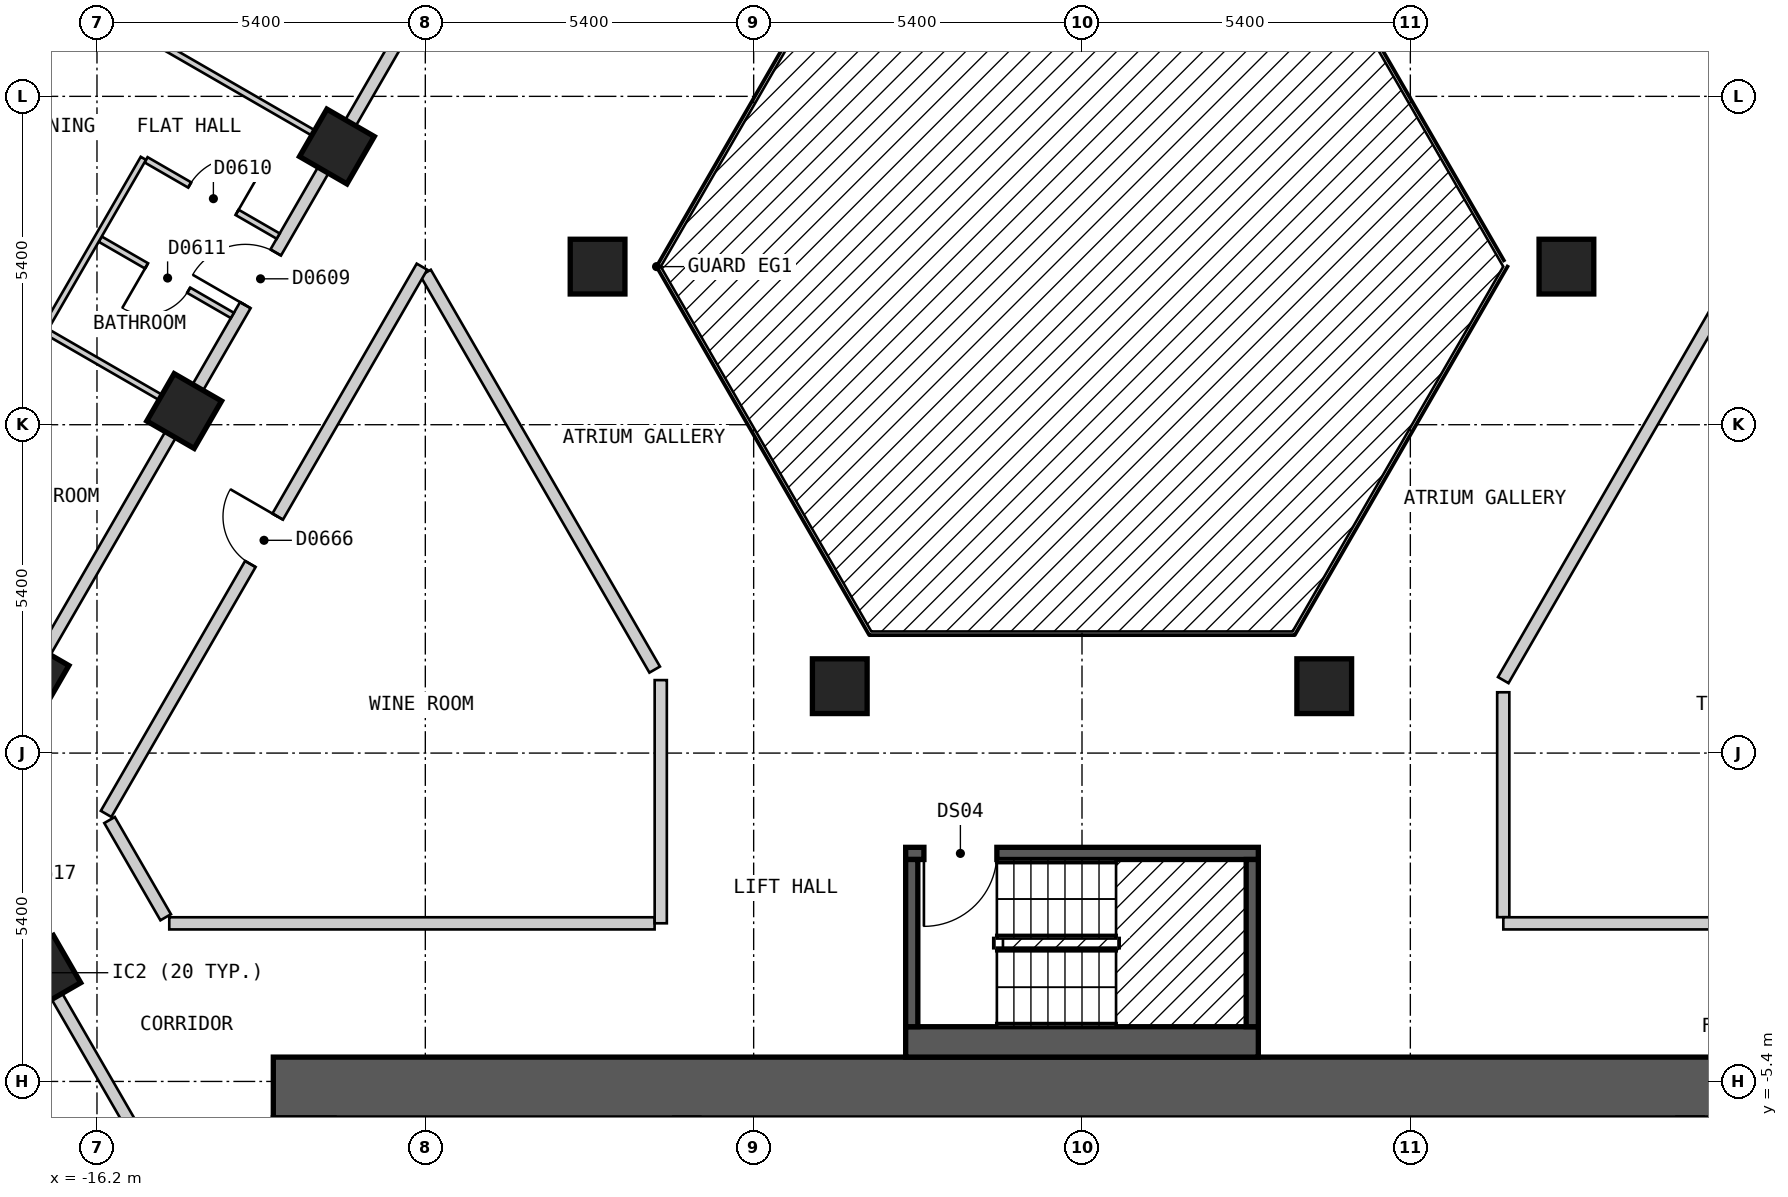
"""IFC4 building model, lengths in metres.
Left out: names, types, materials, properties, quantities, classifications, styles, units other than length and angle.
Written with IfcOpenShell. Run it as: python <this file> out.ifc"""

import sys

from ifc_helpers import new_model, si_unit, direction, frame, frame_2d, origin, origin_2d, place, context, subcontext, project, spatial, polyline, rectangle, outline, extrude, element, fill, save


model = new_model("IFC4")
c1 = context("Model", 3, precision=1e-05, world=origin(), true_north=direction((0.0, 1.0)))
c2 = subcontext(c1, "Body", "Model", "MODEL_VIEW")
j1 = project(units=[si_unit("LENGTHUNIT", "METRE"), si_unit("PLANEANGLEUNIT", "RADIAN")], contexts=[c1])
p1 = place(None, origin())
s1 = spatial("IfcSite", under=j1, at=p1, CompositionType="ELEMENT")
p2 = place(p1, origin())
s2 = spatial("IfcBuilding", under=s1, at=p2, CompositionType="ELEMENT")
p3 = place(p2, frame((0.0, 0.0, 75.0)))
s3 = spatial("IfcBuildingStorey", under=s2, at=p3, CompositionType="ELEMENT", Elevation=75.0)
for number, where, z_axis, x_axis in (
    (1, (-17.083, -3.612, 0.0), (0.0, 0.0, 1.0), (0.5, -0.866, 0.0)),
    (2, (3.984, 1.1, 0.0), (0.0, 0.0, 1.0), (1.0, 0.0, 0.0)),
    (3, (7.967, 8.0, 0.0), (0.0, 0.0, 1.0), (1.0, 0.0, 0.0)),
    (4, (-7.967, 8.0, 0.0), (0.0, 0.0, 1.0), (1.0, 0.0, 0.0)),
    (5, (-12.254, 9.975, 0.0), (0.0, 0.0, 1.0), (-0.5, -0.866, 0.0)),
    (6, (-14.766, 5.625, 0.0), (0.0, 0.0, 1.0), (-0.5, -0.866, 0.0)),
    (7, (-3.984, 1.1, 0.0), (0.0, 0.0, 1.0), (1.0, 0.0, 0.0)),
    (8, (-17.277, 1.275, 0.0), (0.0, 0.0, 1.0), (-0.5, -0.866, 0.0)),
):
    element("IfcColumn", number, at=place(p3, frame(where, z_axis=z_axis, x_axis=x_axis)), inside=s3, PredefinedType="COLUMN", context=c2, shape_type="SweptSolid", body=[
        extrude(rectangle(XDim=0.9, YDim=0.9, at=origin_2d()), origin(), (0.0, 0.0, 1.0), 3.0),
    ])
p4 = place(p3, frame((-13.3, -5.5, 0.0), z_axis=(0.0, 0.0, 1.0), x_axis=(1.0, 0.0, 0.0)))
e9 = element("IfcWall", 9, at=p4, inside=s3, PredefinedType="SHEAR", context=c2, shape_type="SweptSolid", body=[
    extrude(rectangle(XDim=26.6, YDim=1.0, at=frame_2d((13.3, 0.0))), origin(), (0.0, 0.0, 1.0), 2.7),
])
p5 = place(p4, frame((23.65, 0.0, 0.0)))
e10 = element("IfcOpeningElement", 10, at=p5, cuts=e9, PredefinedType="OPENING", context=c2, shape_type="SweptSolid", body=[
    extrude(rectangle(XDim=1.2, YDim=2.1, at=frame_2d((0.6, 1.05))), frame((0.0, 0.51, 0.0), z_axis=(0.0, -1.0, 0.0), x_axis=(1.0, 0.0, 0.0)), (0.0, 0.0, 1.0), 1.02),
])
p6 = place(p3, frame((-15.747, 24.425, 0.0), z_axis=(0.0, 0.0, 1.0), x_axis=(-0.500027479704, -0.866009537788, 0.0)))
e11 = element("IfcWall", 11, at=p6, inside=s3, PredefinedType="SOLIDWALL", context=c2, shape_type="SweptSolid", body=[
    extrude(outline(polyline([(0.0, -0.15), (26.559, -0.15), (26.478, 0.15), (0.08, 0.15), (0.0, -0.15)])), origin(), (0.0, 0.0, 1.0), 2.7),
])
p7 = place(p6, frame((1.227, 0.0, 0.15)))
e12 = element("IfcOpeningElement", 12, at=p7, cuts=e11, PredefinedType="OPENING", context=c2, shape_type="SweptSolid", body=[
    extrude(rectangle(XDim=1.5, YDim=2.1, at=frame_2d((0.75, 1.05))), frame((0.0, 0.16, 0.0), z_axis=(0.0, -1.0, 0.0), x_axis=(1.0, 0.0, 0.0)), (0.0, 0.0, 1.0), 0.32),
])
p8 = place(p6, frame((3.739, 0.0, 0.15)))
e13 = element("IfcOpeningElement", 13, at=p8, cuts=e11, PredefinedType="OPENING", context=c2, shape_type="SweptSolid", body=[
    extrude(rectangle(XDim=1.5, YDim=2.1, at=frame_2d((0.75, 1.05))), frame((0.0, 0.16, 0.0), z_axis=(0.0, -1.0, 0.0), x_axis=(1.0, 0.0, 0.0)), (0.0, 0.0, 1.0), 0.32),
])
p9 = place(p6, frame((6.25, 0.0, 0.15)))
e14 = element("IfcOpeningElement", 14, at=p9, cuts=e11, PredefinedType="OPENING", context=c2, shape_type="SweptSolid", body=[
    extrude(rectangle(XDim=1.5, YDim=2.1, at=frame_2d((0.75, 1.05))), frame((0.0, 0.16, 0.0), z_axis=(0.0, -1.0, 0.0), x_axis=(1.0, 0.0, 0.0)), (0.0, 0.0, 1.0), 0.32),
])
p10 = place(p6, frame((8.761, 0.0, 0.15)))
e15 = element("IfcOpeningElement", 15, at=p10, cuts=e11, PredefinedType="OPENING", context=c2, shape_type="SweptSolid", body=[
    extrude(rectangle(XDim=1.5, YDim=2.1, at=frame_2d((0.75, 1.05))), frame((0.0, 0.16, 0.0), z_axis=(0.0, -1.0, 0.0), x_axis=(1.0, 0.0, 0.0)), (0.0, 0.0, 1.0), 0.32),
])
p11 = place(p6, frame((11.273, 0.0, 0.15)))
e16 = element("IfcOpeningElement", 16, at=p11, cuts=e11, PredefinedType="OPENING", context=c2, shape_type="SweptSolid", body=[
    extrude(rectangle(XDim=1.5, YDim=2.1, at=frame_2d((0.75, 1.05))), frame((0.0, 0.16, 0.0), z_axis=(0.0, -1.0, 0.0), x_axis=(1.0, 0.0, 0.0)), (0.0, 0.0, 1.0), 0.32),
])
p12 = place(p6, frame((13.785, 0.0, 0.15)))
e17 = element("IfcOpeningElement", 17, at=p12, cuts=e11, PredefinedType="OPENING", context=c2, shape_type="SweptSolid", body=[
    extrude(rectangle(XDim=1.5, YDim=2.1, at=frame_2d((0.75, 1.05))), frame((0.0, 0.16, 0.0), z_axis=(0.0, -1.0, 0.0), x_axis=(1.0, 0.0, 0.0)), (0.0, 0.0, 1.0), 0.32),
])
p13 = place(p6, frame((16.296, 0.0, 0.15)))
e18 = element("IfcOpeningElement", 18, at=p13, cuts=e11, PredefinedType="OPENING", context=c2, shape_type="SweptSolid", body=[
    extrude(rectangle(XDim=1.5, YDim=2.1, at=frame_2d((0.75, 1.05))), frame((0.0, 0.16, 0.0), z_axis=(0.0, -1.0, 0.0), x_axis=(1.0, 0.0, 0.0)), (0.0, 0.0, 1.0), 0.32),
])
p14 = place(p6, frame((18.807, 0.0, 0.15)))
e19 = element("IfcOpeningElement", 19, at=p14, cuts=e11, PredefinedType="OPENING", context=c2, shape_type="SweptSolid", body=[
    extrude(rectangle(XDim=1.5, YDim=2.1, at=frame_2d((0.75, 1.05))), frame((0.0, 0.16, 0.0), z_axis=(0.0, -1.0, 0.0), x_axis=(1.0, 0.0, 0.0)), (0.0, 0.0, 1.0), 0.32),
])
p15 = place(p6, frame((21.319, 0.0, 0.15)))
e20 = element("IfcOpeningElement", 20, at=p15, cuts=e11, PredefinedType="OPENING", context=c2, shape_type="SweptSolid", body=[
    extrude(rectangle(XDim=1.5, YDim=2.1, at=frame_2d((0.75, 1.05))), frame((0.0, 0.16, 0.0), z_axis=(0.0, -1.0, 0.0), x_axis=(1.0, 0.0, 0.0)), (0.0, 0.0, 1.0), 0.32),
])
p16 = place(p6, frame((23.831, 0.0, 0.15)))
e21 = element("IfcOpeningElement", 21, at=p16, cuts=e11, PredefinedType="OPENING", context=c2, shape_type="SweptSolid", body=[
    extrude(rectangle(XDim=1.5, YDim=2.1, at=frame_2d((0.75, 1.05))), frame((0.0, 0.16, 0.0), z_axis=(0.0, -1.0, 0.0), x_axis=(1.0, 0.0, 0.0)), (0.0, 0.0, 1.0), 0.32),
])
p17 = place(p3, frame((-2.9, -4.75, 0.0), z_axis=(0.0, 0.0, 1.0), x_axis=(1.0, 0.0, 0.0)))
e22 = element("IfcWall", 22, at=p17, inside=s3, PredefinedType="SOLIDWALL", context=c2, shape_type="SweptSolid", body=[
    extrude(rectangle(XDim=5.8, YDim=0.5, at=frame_2d((2.9, 0.0))), origin(), (0.0, 0.0, 1.0), 2.7),
])
p18 = place(p3, frame((-2.9, -1.65, 0.0), z_axis=(0.0, 0.0, 1.0), x_axis=(1.0, 0.0, 0.0)))
e23 = element("IfcWall", 23, at=p18, inside=s3, PredefinedType="SOLIDWALL", context=c2, shape_type="SweptSolid", body=[
    extrude(rectangle(XDim=5.8, YDim=0.2, at=frame_2d((2.9, 0.0))), origin(), (0.0, 0.0, 1.0), 2.7),
])
p19 = place(p18, frame((0.3, 0.0, 0.0)))
e24 = element("IfcOpeningElement", 24, at=p19, cuts=e23, PredefinedType="OPENING", context=c2, shape_type="SweptSolid", body=[
    extrude(rectangle(XDim=1.2, YDim=2.1, at=frame_2d((0.6, 1.05))), frame((0.0, 0.11, 0.0), z_axis=(0.0, -1.0, 0.0), x_axis=(1.0, 0.0, 0.0)), (0.0, 0.0, 1.0), 0.22),
])
for number, where, z_axis, x_axis in (
    (25, (-2.8, -4.5, 0.0), (0.0, 0.0, 1.0), (0.0, 1.0, 0.0)),
    (26, (2.8, -4.5, 0.0), (0.0, 0.0, 1.0), (0.0, 1.0, 0.0)),
):
    element("IfcWall", number, at=place(p3, frame(where, z_axis=z_axis, x_axis=x_axis)), inside=s3, PredefinedType="SOLIDWALL", context=c2, shape_type="SweptSolid", body=[
        extrude(rectangle(XDim=2.75, YDim=0.2, at=frame_2d((1.375, 0.0))), origin(), (0.0, 0.0, 1.0), 2.7),
    ])
p20 = place(p3, frame((-10.796, 7.899, 0.0), z_axis=(0.0, 0.0, 1.0), x_axis=(0.500010383074, -0.866019409031, 0.0)))
e27 = element("IfcWall", 27, at=p20, inside=s3, PredefinedType="PARTITIONING", context=c2, shape_type="SweptSolid", body=[
    extrude(rectangle(XDim=7.535, YDim=0.2, at=frame_2d((3.768, 0.0))), origin(), (0.0, 0.0, 1.0), 2.7),
])
p21 = place(p3, frame((-15.993, -1.101, 0.0), z_axis=(0.0, 0.0, 1.0), x_axis=(0.499894174133, -0.866086493757, 0.0)))
e28 = element("IfcWall", 28, at=p21, inside=s3, PredefinedType="PARTITIONING", context=c2, shape_type="SweptSolid", body=[
    extrude(rectangle(XDim=1.846, YDim=0.2, at=frame_2d((0.923, 0.0))), origin(), (0.0, 0.0, 1.0), 2.7),
])
p22 = place(p3, frame((-18.533, -1.101, 0.0), z_axis=(0.0, 0.0, 1.0), x_axis=(0.500022085096, -0.866012652573, 0.0)))
e29 = element("IfcWall", 29, at=p22, inside=s3, PredefinedType="PARTITIONING", context=c2, shape_type="SweptSolid", body=[
    extrude(rectangle(XDim=6.066, YDim=0.2, at=frame_2d((3.033, 0.0))), origin(), (0.0, 0.0, 1.0), 2.7),
])
p23 = place(p22, frame((0.532, 0.0, 0.0)))
e30 = element("IfcOpeningElement", 30, at=p23, cuts=e29, PredefinedType="OPENING", context=c2, shape_type="SweptSolid", body=[
    extrude(rectangle(XDim=1.0, YDim=2.1, at=frame_2d((0.5, 1.05))), frame((0.0, 0.11, 0.0), z_axis=(0.0, -1.0, 0.0), x_axis=(1.0, 0.0, 0.0)), (0.0, 0.0, 1.0), 0.22),
])
p24 = place(p3, frame((8.488, 16.5, 0.0), z_axis=(0.0, 0.0, 1.0), x_axis=(0.499986836607, -0.86603300354, 0.0)))
e31 = element("IfcWall", 31, at=p24, inside=s3, PredefinedType="PARTITIONING", context=c2, shape_type="SweptSolid", body=[
    extrude(rectangle(XDim=20.09, YDim=0.2, at=frame_2d((10.045, 0.0))), origin(), (0.0, 0.0, 1.0), 2.7),
])
p25 = place(p24, frame((14.569, 0.0, 0.0)))
e32 = element("IfcOpeningElement", 32, at=p25, cuts=e31, PredefinedType="OPENING", context=c2, shape_type="SweptSolid", body=[
    extrude(rectangle(XDim=1.0, YDim=2.1, at=frame_2d((0.5, 1.05))), frame((0.0, 0.11, 0.0), z_axis=(0.0, -1.0, 0.0), x_axis=(1.0, 0.0, 0.0)), (0.0, 0.0, 1.0), 0.22),
])
p26 = place(p3, frame((6.928, 1.0, 0.0), z_axis=(0.0, 0.0, 1.0), x_axis=(0.0, -1.0, 0.0)))
e33 = element("IfcWall", 33, at=p26, inside=s3, PredefinedType="PARTITIONING", context=c2, shape_type="SweptSolid", body=[
    extrude(rectangle(XDim=3.699, YDim=0.2, at=frame_2d((1.85, 0.0))), origin(), (0.0, 0.0, 1.0), 2.7),
])
p27 = place(p3, frame((-15.011, -2.8, 0.0), z_axis=(0.0, 0.0, 1.0), x_axis=(1.0, 0.0, 0.0)))
e34 = element("IfcWall", 34, at=p27, inside=s3, PredefinedType="PARTITIONING", context=c2, shape_type="SweptSolid", body=[
    extrude(rectangle(XDim=7.982, YDim=0.2, at=frame_2d((3.991, 0.0))), origin(), (0.0, 0.0, 1.0), 2.7),
])
p28 = place(p3, frame((6.929, -2.8, 0.0), z_axis=(0.0, 0.0, 1.0), x_axis=(1.0, 0.0, 0.0)))
e35 = element("IfcWall", 35, at=p28, inside=s3, PredefinedType="PARTITIONING", context=c2, shape_type="SweptSolid", body=[
    extrude(rectangle(XDim=7.966, YDim=0.2, at=frame_2d((3.983, 0.0))), origin(), (0.0, 0.0, 1.0), 2.7),
])
p29 = place(p3, frame((6.928, 1.2, 0.0), z_axis=(0.0, 0.0, 1.0), x_axis=(0.500055327065, 0.865993458332, 0.0)))
e36 = element("IfcWall", 36, at=p29, inside=s3, PredefinedType="PARTITIONING", context=c2, shape_type="SweptSolid", body=[
    extrude(rectangle(XDim=7.851, YDim=0.2, at=frame_2d((3.926, 0.0))), origin(), (0.0, 0.0, 1.0), 2.7),
])
p30 = place(p3, frame((-16.05, -1.0, 0.0), z_axis=(0.0, 0.0, 1.0), x_axis=(0.499962449088, 0.866047082728, 0.0)))
e37 = element("IfcWall", 37, at=p30, inside=s3, PredefinedType="PARTITIONING", context=c2, shape_type="SweptSolid", body=[
    extrude(rectangle(XDim=10.391, YDim=0.2, at=frame_2d((5.195, 0.0))), origin(), (0.0, 0.0, 1.0), 2.7),
])
p31 = place(p30, frame((4.745, 0.0, 0.0)))
e38 = element("IfcOpeningElement", 38, at=p31, cuts=e37, PredefinedType="OPENING", context=c2, shape_type="SweptSolid", body=[
    extrude(rectangle(XDim=0.9, YDim=2.1, at=frame_2d((0.45, 1.05))), frame((0.0, 0.11, 0.0), z_axis=(0.0, -1.0, 0.0), x_axis=(1.0, 0.0, 0.0)), (0.0, 0.0, 1.0), 0.22),
])
p32 = place(p3, frame((-18.562, -0.951, 0.0), z_axis=(0.0, 0.0, 1.0), x_axis=(0.499992962407, 0.866029466902, 0.0)))
e39 = element("IfcWall", 39, at=p32, inside=s3, PredefinedType="PARTITIONING", context=c2, shape_type="SweptSolid", body=[
    extrude(rectangle(XDim=20.208, YDim=0.2, at=frame_2d((10.104, 0.0))), origin(), (0.0, 0.0, 1.0), 2.7),
])
p33 = place(p32, frame((9.604, 0.0, 0.0)))
e40 = element("IfcOpeningElement", 40, at=p33, cuts=e39, PredefinedType="OPENING", context=c2, shape_type="SweptSolid", body=[
    extrude(rectangle(XDim=1.0, YDim=2.1, at=frame_2d((0.5, 1.05))), frame((0.0, 0.11, 0.0), z_axis=(0.0, -1.0, 0.0), x_axis=(1.0, 0.0, 0.0)), (0.0, 0.0, 1.0), 0.22),
])
p34 = place(p3, frame((-6.928, -2.799, 0.0), z_axis=(0.0, 0.0, 1.0), x_axis=(0.0, 1.0, 0.0)))
e41 = element("IfcWall", 41, at=p34, inside=s3, PredefinedType="PARTITIONING", context=c2, shape_type="SweptSolid", body=[
    extrude(rectangle(XDim=3.999, YDim=0.2, at=frame_2d((2.0, 0.0))), origin(), (0.0, 0.0, 1.0), 2.7),
])
p35 = place(p3, frame((-16.147, 8.452, 0.0), z_axis=(0.0, 0.0, 1.0), x_axis=(0.866080321209, -0.499904868165, 0.0)))
e42 = element("IfcWall", 42, at=p35, inside=s3, PredefinedType="PARTITIONING", context=c2, shape_type="SweptSolid", body=[
    extrude(rectangle(XDim=2.51, YDim=0.1, at=frame_2d((1.255, 0.0))), origin(), (0.0, 0.0, 1.0), 2.7),
])
p36 = place(p35, frame((0.88, 0.0, 0.0)))
e43 = element("IfcOpeningElement", 43, at=p36, cuts=e42, PredefinedType="OPENING", context=c2, shape_type="SweptSolid", body=[
    extrude(rectangle(XDim=0.8, YDim=2.1, at=frame_2d((0.4, 1.05))), frame((0.0, 0.06, 0.0), z_axis=(0.0, -1.0, 0.0), x_axis=(1.0, 0.0, 0.0)), (0.0, 0.0, 1.0), 0.12),
])
p37 = place(p3, frame((-23.513, 10.675, 0.0), z_axis=(0.0, 0.0, 1.0), x_axis=(0.866041268327, -0.499972520799, 0.0)))
e44 = element("IfcWall", 44, at=p37, inside=s3, PredefinedType="PARTITIONING", context=c2, shape_type="SweptSolid", body=[
    extrude(rectangle(XDim=10.0, YDim=0.1, at=frame_2d((5.0, 0.0))), origin(), (0.0, 0.0, 1.0), 2.7),
])
p38 = place(p37, frame((4.325, 0.0, 0.0)))
e45 = element("IfcOpeningElement", 45, at=p38, cuts=e44, PredefinedType="OPENING", context=c2, shape_type="SweptSolid", body=[
    extrude(rectangle(XDim=0.9, YDim=2.1, at=frame_2d((0.45, 1.05))), frame((0.0, 0.06, 0.0), z_axis=(0.0, -1.0, 0.0), x_axis=(1.0, 0.0, 0.0)), (0.0, 0.0, 1.0), 0.12),
])
p39 = place(p3, frame((-15.393, 9.757, 0.0), z_axis=(0.0, 0.0, 1.0), x_axis=(0.865940918122, -0.500146304917, 0.0)))
e46 = element("IfcWall", 46, at=p39, inside=s3, PredefinedType="PARTITIONING", context=c2, shape_type="SweptSolid", body=[
    extrude(rectangle(XDim=2.51, YDim=0.1, at=frame_2d((1.255, 0.0))), origin(), (0.0, 0.0, 1.0), 2.7),
])
p40 = place(p39, frame((0.829, 0.0, 0.0)))
e47 = element("IfcOpeningElement", 47, at=p40, cuts=e46, PredefinedType="OPENING", context=c2, shape_type="SweptSolid", body=[
    extrude(rectangle(XDim=0.9, YDim=2.1, at=frame_2d((0.45, 1.05))), frame((0.0, 0.06, 0.0), z_axis=(0.0, -1.0, 0.0), x_axis=(1.0, 0.0, 0.0)), (0.0, 0.0, 1.0), 0.12),
])
p41 = place(p3, frame((-21.001, 15.025, 0.0), z_axis=(0.0, 0.0, 1.0), x_axis=(0.866016855193, -0.500014806302, 0.0)))
e48 = element("IfcWall", 48, at=p41, inside=s3, PredefinedType="PARTITIONING", context=c2, shape_type="SweptSolid", body=[
    extrude(rectangle(XDim=10.0, YDim=0.1, at=frame_2d((5.0, 0.0))), origin(), (0.0, 0.0, 1.0), 2.7),
])
p42 = place(p41, frame((4.305, 0.0, 0.0)))
e49 = element("IfcOpeningElement", 49, at=p42, cuts=e48, PredefinedType="OPENING", context=c2, shape_type="SweptSolid", body=[
    extrude(rectangle(XDim=0.9, YDim=2.1, at=frame_2d((0.45, 1.05))), frame((0.0, 0.06, 0.0), z_axis=(0.0, -1.0, 0.0), x_axis=(1.0, 0.0, 0.0)), (0.0, 0.0, 1.0), 0.12),
])
p43 = place(p3, frame((-17.044, 6.999, 0.0), z_axis=(0.0, 0.0, 1.0), x_axis=(0.500176309913, 0.865923587277, 0.0)))
e50 = element("IfcWall", 50, at=p43, inside=s3, PredefinedType="PARTITIONING", context=c2, shape_type="SweptSolid", body=[
    extrude(rectangle(XDim=3.213, YDim=0.1, at=frame_2d((1.606, 0.0))), origin(), (0.0, 0.0, 1.0), 2.7),
])
p44 = place(p19, origin())
e51 = element("IfcDoor", 51, at=p44, inside=s3, OperationType="SINGLE_SWING_LEFT", PredefinedType="DOOR", context=c2, shape_type="SweptSolid", body=[
    extrude(rectangle(XDim=1.2, YDim=2.1, at=frame_2d((0.6, 1.05))), frame((0.0, 0.025, 0.0), z_axis=(0.0, -1.0, 0.0), x_axis=(1.0, 0.0, 0.0)), (0.0, 0.0, 1.0), 0.05),
])
fill(e24, e51)
p45 = place(p33, origin())
e52 = element("IfcDoor", 52, at=p45, inside=s3, OperationType="SINGLE_SWING_LEFT", PredefinedType="DOOR", context=c2, shape_type="SweptSolid", body=[
    extrude(rectangle(XDim=1.0, YDim=2.1, at=frame_2d((0.5, 1.05))), frame((0.0, 0.025, 0.0), z_axis=(0.0, -1.0, 0.0), x_axis=(1.0, 0.0, 0.0)), (0.0, 0.0, 1.0), 0.05),
])
fill(e40, e52)
p46 = place(p40, origin())
e53 = element("IfcDoor", 53, at=p46, inside=s3, OperationType="SINGLE_SWING_RIGHT", PredefinedType="DOOR", context=c2, shape_type="SweptSolid", body=[
    extrude(rectangle(XDim=0.9, YDim=2.1, at=frame_2d((0.45, 1.05))), frame((0.0, 0.025, 0.0), z_axis=(0.0, -1.0, 0.0), x_axis=(1.0, 0.0, 0.0)), (0.0, 0.0, 1.0), 0.05),
])
fill(e47, e53)
p47 = place(p36, origin())
e54 = element("IfcDoor", 54, at=p47, inside=s3, OperationType="SINGLE_SWING_LEFT", PredefinedType="DOOR", context=c2, shape_type="SweptSolid", body=[
    extrude(rectangle(XDim=0.8, YDim=2.1, at=frame_2d((0.4, 1.05))), frame((0.0, 0.025, 0.0), z_axis=(0.0, -1.0, 0.0), x_axis=(1.0, 0.0, 0.0)), (0.0, 0.0, 1.0), 0.05),
])
fill(e43, e54)
p48 = place(p31, origin())
e55 = element("IfcDoor", 55, at=p48, inside=s3, OperationType="SINGLE_SWING_RIGHT", PredefinedType="DOOR", context=c2, shape_type="SweptSolid", body=[
    extrude(rectangle(XDim=0.9, YDim=2.1, at=frame_2d((0.45, 1.05))), frame((0.0, 0.025, 0.0), z_axis=(0.0, -1.0, 0.0), x_axis=(1.0, 0.0, 0.0)), (0.0, 0.0, 1.0), 0.05),
])
fill(e38, e55)
save(model, sys.argv[1])
